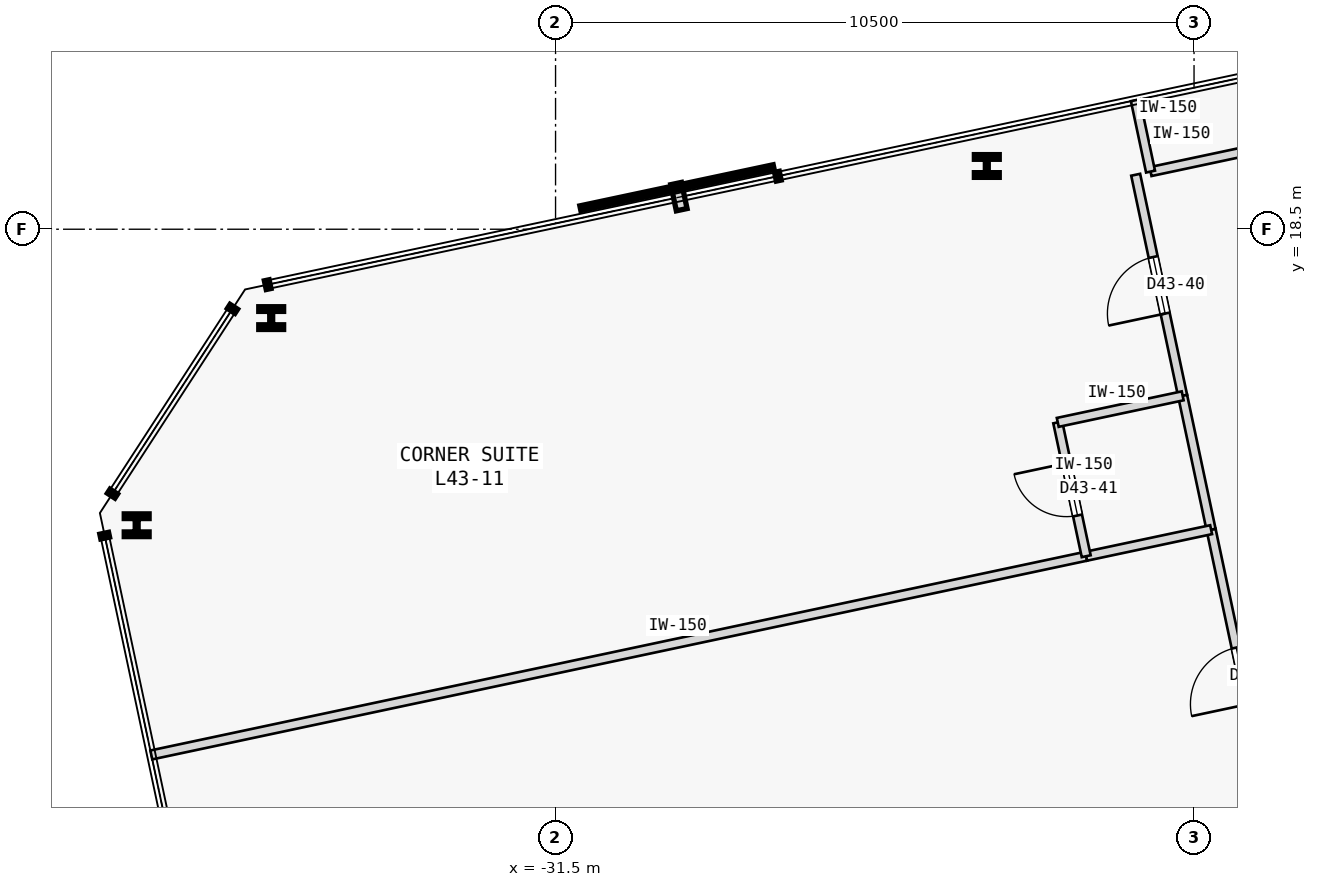
"""IFC4 building model, lengths in metres.
Left out: names, types, materials, properties, quantities, classifications, styles, units other than length and angle.
Written with IfcOpenShell. Run it as: python <this file> out.ifc"""

import sys

from ifc_helpers import new_model, si_unit, direction, frame, frame_2d, origin, origin_2d, place, context, subcontext, project, spatial, rectangle, i_section, extrude, element, fill, save


model = new_model("IFC4")
c1 = context("Model", 3, precision=1e-05, world=origin(), true_north=direction((0.0, 1.0)))
c2 = subcontext(c1, "Body", "Model", "MODEL_VIEW")
j1 = project(units=[si_unit("LENGTHUNIT", "METRE"), si_unit("PLANEANGLEUNIT", "RADIAN")], contexts=[c1])
p1 = place(None, origin())
s1 = spatial("IfcSite", under=j1, at=p1, CompositionType="ELEMENT")
p2 = place(p1, origin())
s2 = spatial("IfcBuilding", under=s1, at=p2, CompositionType="ELEMENT")
p3 = place(p2, frame((0.0, 0.0, 168.4)))
s3 = spatial("IfcBuildingStorey", under=s2, at=p3, CompositionType="ELEMENT", Elevation=168.4)
for number, where, z_axis, x_axis in (
    (1, (-24.408, 19.54, 0.0), (0.0, 0.0, 1.0), (1.0, 0.0, 0.0)),
    (2, (-36.176, 17.039, 0.0), (0.0, 0.0, 1.0), (1.0, 0.0, 0.0)),
    (3, (-38.389, 13.632, 0.0), (0.0, 0.0, 1.0), (1.0, 0.0, 0.0)),
):
    element("IfcColumn", number, at=place(p3, frame(where, z_axis=z_axis, x_axis=x_axis)), inside=s3, PredefinedType="COLUMN", context=c2, shape_type="SweptSolid", body=[
        extrude(i_section(OverallWidth=0.409, OverallDepth=0.374, WebThickness=0.048, FlangeThickness=0.077, FilletRadius=0.015, at=origin_2d()), origin(), (0.0, 0.0, 1.0), 3.4),
    ])
p4 = place(p3, frame((-21.715, 19.448, 0.0), z_axis=(0.0, 0.0, 1.0), x_axis=(0.978160192495, 0.207852442415, 0.0)))
e4 = element("IfcWall", 4, at=p4, inside=s3, PredefinedType="PARTITIONING", context=c2, shape_type="SweptSolid", body=[
    extrude(rectangle(XDim=1.85, YDim=0.15, at=frame_2d((0.925, 0.0))), origin(), (0.0, 0.0, 1.0), 3.175),
])
p5 = place(p3, frame((-19.697, 8.751, 0.0), z_axis=(0.0, 0.0, 1.0), x_axis=(-0.207887265829, 0.978152792107, 0.0)))
e5 = element("IfcWall", 5, at=p5, inside=s3, PredefinedType="PARTITIONING", context=c2, shape_type="SweptSolid", body=[
    extrude(rectangle(XDim=4.916, YDim=0.15, at=frame_2d((2.458, 0.0))), origin(), (0.0, 0.0, 1.0), 3.175),
])
p6 = place(p5, frame((1.983, 0.0, 0.0)))
e6 = element("IfcOpeningElement", 6, at=p6, cuts=e5, PredefinedType="OPENING", context=c2, shape_type="SweptSolid", body=[
    extrude(rectangle(XDim=0.95, YDim=2.15, at=frame_2d((0.475, 1.075))), frame((0.0, 0.085, 0.0), z_axis=(0.0, -1.0, 0.0), x_axis=(1.0, 0.0, 0.0)), (0.0, 0.0, 1.0), 0.17),
])
p7 = place(p3, frame((-21.187, 15.76, 0.0), z_axis=(0.0, 0.0, 1.0), x_axis=(-0.207949879289, 0.978139482745, 0.0)))
e7 = element("IfcWall", 7, at=p7, inside=s3, PredefinedType="PARTITIONING", context=c2, shape_type="SweptSolid", body=[
    extrude(rectangle(XDim=3.717, YDim=0.15, at=frame_2d((1.858, 0.0))), origin(), (0.0, 0.0, 1.0), 3.175),
])
p8 = place(p7, frame((1.384, 0.0, 0.0)))
e8 = element("IfcOpeningElement", 8, at=p8, cuts=e7, PredefinedType="OPENING", context=c2, shape_type="SweptSolid", body=[
    extrude(rectangle(XDim=0.95, YDim=2.15, at=frame_2d((0.475, 1.075))), frame((0.0, 0.085, 0.0), z_axis=(0.0, -1.0, 0.0), x_axis=(1.0, 0.0, 0.0)), (0.0, 0.0, 1.0), 0.17),
])
p9 = place(p3, frame((-20.719, 13.559, 0.0), z_axis=(0.0, 0.0, 1.0), x_axis=(-0.207891197838, 0.978151956427, 0.0)))
e9 = element("IfcWall", 9, at=p9, inside=s3, PredefinedType="PARTITIONING", context=c2, shape_type="SweptSolid", body=[
    extrude(rectangle(XDim=2.25, YDim=0.15, at=frame_2d((1.125, 0.0))), origin(), (0.0, 0.0, 1.0), 3.175),
])
p10 = place(p3, frame((-21.715, 19.448, 0.0), z_axis=(0.0, 0.0, 1.0), x_axis=(-0.20795853359, 0.978137642823, 0.0)))
e10 = element("IfcWall", 10, at=p10, inside=s3, PredefinedType="PARTITIONING", context=c2, shape_type="SweptSolid", body=[
    extrude(rectangle(XDim=1.2, YDim=0.15, at=frame_2d((0.6, 0.0))), origin(), (0.0, 0.0, 1.0), 3.175),
])
p11 = place(p3, frame((-38.148, 9.855, 0.0), z_axis=(0.0, 0.0, 1.0), x_axis=(0.978146137903, 0.207918572776, 0.0)))
e11 = element("IfcWall", 11, at=p11, inside=s3, PredefinedType="PARTITIONING", context=c2, shape_type="SweptSolid", body=[
    extrude(rectangle(XDim=15.718, YDim=0.15, at=frame_2d((7.859, 0.0))), origin(), (0.0, 0.0, 1.0), 3.175),
])
p12 = place(p3, frame((-22.773, 13.123, 0.0), z_axis=(0.0, 0.0, 1.0), x_axis=(0.97815826, 0.207861536591, 0.0)))
e12 = element("IfcWall", 12, at=p12, inside=s3, PredefinedType="PARTITIONING", context=c2, shape_type="SweptSolid", body=[
    extrude(rectangle(XDim=2.1, YDim=0.15, at=frame_2d((1.05, 0.0))), origin(), (0.0, 0.0, 1.0), 3.175),
])
p13 = place(p3, frame((-22.773, 13.123, 0.0), z_axis=(0.0, 0.0, 1.0), x_axis=(-0.207913264065, 0.978147266328, 0.0)))
e13 = element("IfcWall", 13, at=p13, inside=s3, PredefinedType="PARTITIONING", context=c2, shape_type="SweptSolid", body=[
    extrude(rectangle(XDim=2.25, YDim=0.15, at=frame_2d((1.125, 0.0))), origin(), (0.0, 0.0, 1.0), 3.175),
])
p14 = place(p13, frame((0.685, 0.0, 0.0)))
e14 = element("IfcOpeningElement", 14, at=p14, cuts=e13, PredefinedType="OPENING", context=c2, shape_type="SweptSolid", body=[
    extrude(rectangle(XDim=0.88, YDim=2.15, at=frame_2d((0.44, 1.075))), frame((0.0, 0.085, 0.0), z_axis=(0.0, -1.0, 0.0), x_axis=(1.0, 0.0, 0.0)), (0.0, 0.0, 1.0), 0.17),
])
p15 = place(p3, frame((-23.241, 15.323, 0.0), z_axis=(0.0, 0.0, 1.0), x_axis=(0.978134617382, 0.207972763311, 0.0)))
e15 = element("IfcWall", 15, at=p15, inside=s3, PredefinedType="PARTITIONING", context=c2, shape_type="SweptSolid", body=[
    extrude(rectangle(XDim=2.1, YDim=0.15, at=frame_2d((1.05, 0.0))), origin(), (0.0, 0.0, 1.0), 3.175),
])
p16 = place(p6, origin())
e16 = element("IfcDoor", 16, at=p16, inside=s3, OperationType="SINGLE_SWING_LEFT", PredefinedType="DOOR", context=c2, shape_type="SweptSolid", body=[
    extrude(rectangle(XDim=0.95, YDim=2.15, at=frame_2d((0.475, 1.075))), frame((0.0, 0.025, 0.0), z_axis=(0.0, -1.0, 0.0), x_axis=(1.0, 0.0, 0.0)), (0.0, 0.0, 1.0), 0.05),
])
fill(e6, e16)
p17 = place(p8, origin())
e17 = element("IfcDoor", 17, at=p17, inside=s3, OperationType="SINGLE_SWING_LEFT", PredefinedType="DOOR", context=c2, shape_type="SweptSolid", body=[
    extrude(rectangle(XDim=0.95, YDim=2.15, at=frame_2d((0.475, 1.075))), frame((0.0, 0.025, 0.0), z_axis=(0.0, -1.0, 0.0), x_axis=(1.0, 0.0, 0.0)), (0.0, 0.0, 1.0), 0.05),
])
fill(e8, e17)
p18 = place(p14, origin())
e18 = element("IfcDoor", 18, at=p18, inside=s3, OperationType="SINGLE_SWING_RIGHT", PredefinedType="DOOR", context=c2, shape_type="SweptSolid", body=[
    extrude(rectangle(XDim=0.88, YDim=2.15, at=frame_2d((0.44, 1.075))), frame((0.0, 0.025, 0.0), z_axis=(0.0, -1.0, 0.0), x_axis=(1.0, 0.0, 0.0)), (0.0, 0.0, 1.0), 0.05),
])
fill(e14, e18)
save(model, sys.argv[1])
